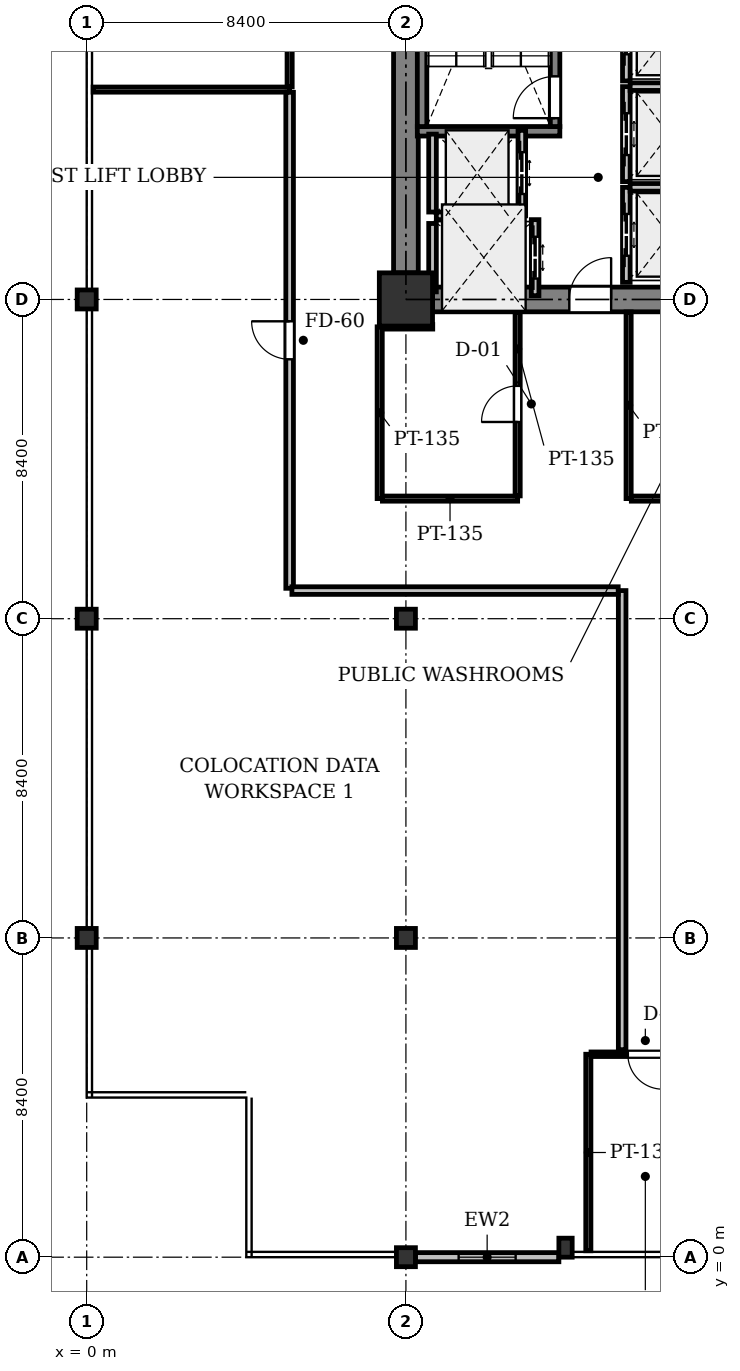
"""IFC4 building model, lengths in metres.
Left out: names, types, materials, properties, quantities, classifications, styles, units other than length and angle.
Written with IfcOpenShell. Run it as: python <this file> out.ifc"""

import sys

from ifc_helpers import new_model, si_unit, direction, frame, frame_2d, origin, origin_2d, place, context, subcontext, project, spatial, rectangle, i_section, extrude, element, fill, save


model = new_model("IFC4")
c1 = context("Model", 3, precision=1e-05, world=origin(), true_north=direction((0.0, 1.0)))
c2 = subcontext(c1, "Body", "Model", "MODEL_VIEW")
j1 = project(units=[si_unit("LENGTHUNIT", "METRE"), si_unit("PLANEANGLEUNIT", "RADIAN")], contexts=[c1])
p1 = place(None, origin())
s1 = spatial("IfcSite", under=j1, at=p1, CompositionType="ELEMENT")
p2 = place(p1, origin())
s2 = spatial("IfcBuilding", under=s1, at=p2, CompositionType="ELEMENT")
p3 = place(p2, frame((0.0, 0.0, 50.0)))
s3 = spatial("IfcBuildingStorey", under=s2, at=p3, CompositionType="ELEMENT", Elevation=50.0)
for number, where, z_axis, x_axis in (
    (1, (0.0, 8.4, 0.0), (0.0, 0.0, 1.0), (1.0, 0.0, 0.0)),
    (2, (0.0, 16.8, 0.0), (0.0, 0.0, 1.0), (1.0, 0.0, 0.0)),
    (3, (0.0, 25.2, 0.0), (0.0, 0.0, 1.0), (1.0, 0.0, 0.0)),
    (4, (8.4, 0.0, 0.0), (0.0, 0.0, 1.0), (1.0, 0.0, 0.0)),
    (5, (8.4, 8.4, 0.0), (0.0, 0.0, 1.0), (1.0, 0.0, 0.0)),
    (6, (8.4, 16.8, 0.0), (0.0, 0.0, 1.0), (1.0, 0.0, 0.0)),
):
    element("IfcColumn", number, at=place(p3, frame(where, z_axis=z_axis, x_axis=x_axis)), inside=s3, PredefinedType="COLUMN", context=c2, shape_type="SweptSolid", body=[
        extrude(i_section(OverallWidth=0.5, OverallDepth=0.5, WebThickness=0.028, FlangeThickness=0.04, at=origin_2d()), origin(), (0.0, 0.0, 1.0), 4.2),
    ])
p4 = place(p3, frame((8.4, 25.2, 0.0), z_axis=(0.0, 0.0, 1.0), x_axis=(1.0, 0.0, 0.0)))
e7 = element("IfcColumn", 7, at=p4, inside=s3, PredefinedType="COLUMN", context=c2, shape_type="SweptSolid", body=[
    extrude(rectangle(XDim=1.4, YDim=1.4, at=origin_2d()), origin(), (0.0, 0.0, 1.0), 4.2),
])
p5 = place(p3, frame((12.6, 0.25, 0.0), z_axis=(0.0, 0.0, 1.0), x_axis=(1.0, 0.0, 0.0)))
e8 = element("IfcColumn", 8, at=p5, inside=s3, PredefinedType="PILASTER", context=c2, shape_type="SweptSolid", body=[
    extrude(rectangle(XDim=0.35, YDim=0.5, at=origin_2d()), origin(), (0.0, 0.0, 1.0), 4.2),
])
p6 = place(p3, frame((12.425, 0.0, 0.0), z_axis=(0.0, 0.0, 1.0), x_axis=(-1.0, 0.0, 0.0)))
e9 = element("IfcWall", 9, at=p6, inside=s3, PredefinedType="STANDARD", context=c2, shape_type="SweptSolid", body=[
    extrude(rectangle(XDim=3.775, YDim=0.24, at=frame_2d((1.888, 0.0))), origin(), (0.0, 0.0, 1.0), 3.471),
])
p7 = place(p6, frame((1.137, 0.0, 0.9)))
e10 = element("IfcOpeningElement", 10, at=p7, cuts=e9, PredefinedType="OPENING", context=c2, shape_type="SweptSolid", body=[
    extrude(rectangle(XDim=1.5, YDim=1.6, at=frame_2d((0.75, 0.8))), frame((0.0, 0.13, 0.0), z_axis=(0.0, -1.0, 0.0), x_axis=(1.0, 0.0, 0.0)), (0.0, 0.0, 1.0), 0.26),
])
p8 = place(p3, frame((8.4, 25.9, 0.0), z_axis=(0.0, 0.0, 1.0), x_axis=(0.0, 1.0, 0.0)))
e11 = element("IfcWall", 11, at=p8, inside=s3, PredefinedType="SHEAR", context=c2, shape_type="SweptSolid", body=[
    extrude(rectangle(XDim=7.0, YDim=0.65, at=frame_2d((3.5, 0.0))), origin(), (0.0, 0.0, 1.0), 3.925),
])
p9 = place(p3, frame((9.1, 25.2, 0.0), z_axis=(0.0, 0.0, 1.0), x_axis=(1.0, 0.0, 0.0)))
e12 = element("IfcWall", 12, at=p9, inside=s3, PredefinedType="SHEAR", context=c2, shape_type="SweptSolid", body=[
    extrude(rectangle(XDim=7.0, YDim=0.65, at=frame_2d((3.5, 0.0))), origin(), (0.0, 0.0, 1.0), 3.925),
])
p10 = place(p9, frame((3.6, 0.0, 0.0)))
e13 = element("IfcOpeningElement", 13, at=p10, cuts=e12, PredefinedType="OPENING", context=c2, shape_type="SweptSolid", body=[
    extrude(rectangle(XDim=1.1, YDim=2.15, at=frame_2d((0.55, 1.075))), frame((0.0, 0.335, 0.0), z_axis=(0.0, -1.0, 0.0), x_axis=(1.0, 0.0, 0.0)), (0.0, 0.0, 1.0), 0.67),
])
p11 = place(p3, frame((12.45, 29.625, 0.0), z_axis=(0.0, 0.0, 1.0), x_axis=(-1.0, 0.0, 0.0)))
e14 = element("IfcWall", 14, at=p11, inside=s3, PredefinedType="SHEAR", context=c2, shape_type="SweptSolid", body=[
    extrude(rectangle(XDim=3.75, YDim=0.25, at=frame_2d((1.875, 0.0))), origin(), (0.0, 0.0, 1.0), 3.925),
])
p12 = place(p3, frame((12.325, 29.75, 0.0), z_axis=(0.0, 0.0, 1.0), x_axis=(0.0, 1.0, 0.0)))
e15 = element("IfcWall", 15, at=p12, inside=s3, PredefinedType="SHEAR", context=c2, shape_type="SweptSolid", body=[
    extrude(rectangle(XDim=7.75, YDim=0.25, at=frame_2d((3.875, 0.0))), origin(), (0.0, 0.0, 1.0), 3.925),
])
p13 = place(p12, frame((0.22, 0.0, 0.0)))
e16 = element("IfcOpeningElement", 16, at=p13, cuts=e15, PredefinedType="OPENING", context=c2, shape_type="SweptSolid", body=[
    extrude(rectangle(XDim=1.1, YDim=2.15, at=frame_2d((0.55, 1.075))), frame((0.0, 0.135, 0.0), z_axis=(0.0, -1.0, 0.0), x_axis=(1.0, 0.0, 0.0)), (0.0, 0.0, 1.0), 0.27),
])
p14 = place(p3, frame((8.825, 29.75, 0.0), z_axis=(0.0, 0.0, 1.0), x_axis=(0.0, 1.0, 0.0)))
e17 = element("IfcWall", 17, at=p14, inside=s3, PredefinedType="SHEAR", context=c2, shape_type="SweptSolid", body=[
    extrude(rectangle(XDim=7.75, YDim=0.25, at=frame_2d((3.875, 0.0))), origin(), (0.0, 0.0, 1.0), 3.925),
])
p15 = place(p3, frame((11.45, 27.4, 0.0), z_axis=(0.0, 0.0, 1.0), x_axis=(0.0, 1.0, 0.0)))
e18 = element("IfcWall", 18, at=p15, inside=s3, PredefinedType="PARTITIONING", context=c2, shape_type="SweptSolid", body=[
    extrude(rectangle(XDim=2.25, YDim=0.2, at=frame_2d((1.125, 0.0))), origin(), (0.0, 0.0, 1.0), 3.925),
])
p16 = place(p15, frame((0.575, 0.0, 0.0)))
e19 = element("IfcOpeningElement", 19, at=p16, cuts=e18, PredefinedType="OPENING", context=c2, shape_type="SweptSolid", body=[
    extrude(rectangle(XDim=1.1, YDim=2.2, at=frame_2d((0.55, 1.1))), frame((0.0, 0.11, 0.0), z_axis=(0.0, -1.0, 0.0), x_axis=(1.0, 0.0, 0.0)), (0.0, 0.0, 1.0), 0.22),
])
p17 = place(p3, frame((9.1, 27.5, 0.0), z_axis=(0.0, 0.0, 1.0), x_axis=(0.0, 1.0, 0.0)))
e20 = element("IfcWall", 20, at=p17, inside=s3, PredefinedType="PARTITIONING", context=c2, shape_type="SweptSolid", body=[
    extrude(rectangle(XDim=2.05, YDim=0.2, at=frame_2d((1.025, 0.0))), origin(), (0.0, 0.0, 1.0), 3.925),
])
p18 = place(p3, frame((9.2, 27.4, 0.0), z_axis=(0.0, 0.0, 1.0), x_axis=(1.0, 0.0, 0.0)))
e21 = element("IfcWall", 21, at=p18, inside=s3, PredefinedType="PARTITIONING", context=c2, shape_type="SweptSolid", body=[
    extrude(rectangle(XDim=2.15, YDim=0.2, at=frame_2d((1.075, 0.0))), origin(), (0.0, 0.0, 1.0), 3.925),
])
p19 = place(p3, frame((11.8, 25.3, 0.0), z_axis=(0.0, 0.0, 1.0), x_axis=(0.0, 1.0, 0.0)))
e22 = element("IfcWall", 22, at=p19, inside=s3, PredefinedType="PARTITIONING", context=c2, shape_type="SweptSolid", body=[
    extrude(rectangle(XDim=2.0, YDim=0.2, at=frame_2d((1.0, 0.0))), origin(), (0.0, 0.0, 1.0), 3.925),
])
p20 = place(p19, frame((0.45, 0.0, 0.0)))
e23 = element("IfcOpeningElement", 23, at=p20, cuts=e22, PredefinedType="OPENING", context=c2, shape_type="SweptSolid", body=[
    extrude(rectangle(XDim=1.1, YDim=2.2, at=frame_2d((0.55, 1.1))), frame((0.0, 0.11, 0.0), z_axis=(0.0, -1.0, 0.0), x_axis=(1.0, 0.0, 0.0)), (0.0, 0.0, 1.0), 0.22),
])
p21 = place(p3, frame((9.1, 25.4, 0.0), z_axis=(0.0, 0.0, 1.0), x_axis=(0.0, 1.0, 0.0)))
e24 = element("IfcWall", 24, at=p21, inside=s3, PredefinedType="PARTITIONING", context=c2, shape_type="SweptSolid", body=[
    extrude(rectangle(XDim=1.8, YDim=0.2, at=frame_2d((0.9, 0.0))), origin(), (0.0, 0.0, 1.0), 3.925),
])
p22 = place(p3, frame((14.2, 25.65, 0.0), z_axis=(0.0, 0.0, 1.0), x_axis=(0.0, 1.0, 0.0)))
e25 = element("IfcWall", 25, at=p22, inside=s3, PredefinedType="PARTITIONING", context=c2, shape_type="SweptSolid", body=[
    extrude(rectangle(XDim=2.5, YDim=0.2, at=frame_2d((1.25, 0.0))), origin(), (0.0, 0.0, 1.0), 3.925),
])
p23 = place(p22, frame((0.7, 0.0, 0.0)))
e26 = element("IfcOpeningElement", 26, at=p23, cuts=e25, PredefinedType="OPENING", context=c2, shape_type="SweptSolid", body=[
    extrude(rectangle(XDim=1.1, YDim=2.2, at=frame_2d((0.55, 1.1))), frame((0.0, 0.11, 0.0), z_axis=(0.0, -1.0, 0.0), x_axis=(1.0, 0.0, 0.0)), (0.0, 0.0, 1.0), 0.22),
])
p24 = place(p3, frame((14.3, 28.15, 0.0), z_axis=(0.0, 0.0, 1.0), x_axis=(1.0, 0.0, 0.0)))
e27 = element("IfcWall", 27, at=p24, inside=s3, PredefinedType="PARTITIONING", context=c2, shape_type="SweptSolid", body=[
    extrude(rectangle(XDim=2.05, YDim=0.2, at=frame_2d((1.025, 0.0))), origin(), (0.0, 0.0, 1.0), 3.925),
])
p25 = place(p3, frame((14.2, 28.3, 0.0), z_axis=(0.0, 0.0, 1.0), x_axis=(0.0, 1.0, 0.0)))
e28 = element("IfcWall", 28, at=p25, inside=s3, PredefinedType="PARTITIONING", context=c2, shape_type="SweptSolid", body=[
    extrude(rectangle(XDim=2.5, YDim=0.2, at=frame_2d((1.25, 0.0))), origin(), (0.0, 0.0, 1.0), 3.925),
])
p26 = place(p25, frame((0.7, 0.0, 0.0)))
e29 = element("IfcOpeningElement", 29, at=p26, cuts=e28, PredefinedType="OPENING", context=c2, shape_type="SweptSolid", body=[
    extrude(rectangle(XDim=1.1, YDim=2.2, at=frame_2d((0.55, 1.1))), frame((0.0, 0.11, 0.0), z_axis=(0.0, -1.0, 0.0), x_axis=(1.0, 0.0, 0.0)), (0.0, 0.0, 1.0), 0.22),
])
p27 = place(p3, frame((14.3, 30.8, 0.0), z_axis=(0.0, 0.0, 1.0), x_axis=(1.0, 0.0, 0.0)))
e30 = element("IfcWall", 30, at=p27, inside=s3, PredefinedType="PARTITIONING", context=c2, shape_type="SweptSolid", body=[
    extrude(rectangle(XDim=2.05, YDim=0.2, at=frame_2d((1.025, 0.0))), origin(), (0.0, 0.0, 1.0), 3.925),
])
p28 = place(p3, frame((14.2, 30.95, 0.0), z_axis=(0.0, 0.0, 1.0), x_axis=(0.0, 1.0, 0.0)))
e31 = element("IfcWall", 31, at=p28, inside=s3, PredefinedType="PARTITIONING", context=c2, shape_type="SweptSolid", body=[
    extrude(rectangle(XDim=2.5, YDim=0.2, at=frame_2d((1.25, 0.0))), origin(), (0.0, 0.0, 1.0), 3.925),
])
p29 = place(p28, frame((0.7, 0.0, 0.0)))
e32 = element("IfcOpeningElement", 32, at=p29, cuts=e31, PredefinedType="OPENING", context=c2, shape_type="SweptSolid", body=[
    extrude(rectangle(XDim=1.1, YDim=2.2, at=frame_2d((0.55, 1.1))), frame((0.0, 0.11, 0.0), z_axis=(0.0, -1.0, 0.0), x_axis=(1.0, 0.0, 0.0)), (0.0, 0.0, 1.0), 0.22),
])
p30 = place(p3, frame((13.2, 5.34, 0.0), z_axis=(0.0, 0.0, 1.0), x_axis=(0.0, -1.0, 0.0)))
e33 = element("IfcWall", 33, at=p30, inside=s3, PredefinedType="PARTITIONING", context=c2, shape_type="SweptSolid", body=[
    extrude(rectangle(XDim=5.171, YDim=0.135, at=frame_2d((2.585, 0.0))), origin(), (0.0, 0.0, 1.0), 3.925),
])
p31 = place(p3, frame((16.128, 5.34, 0.0), z_axis=(0.0, 0.0, 1.0), x_axis=(-1.0, 0.0, 0.0)))
e34 = element("IfcWall", 34, at=p31, inside=s3, PredefinedType="PARTITIONING", context=c2, shape_type="SweptSolid", body=[
    extrude(rectangle(XDim=2.857, YDim=0.12, at=frame_2d((1.428, 0.0))), origin(), (0.0, 0.0, 1.0), 3.925),
])
p32 = place(p31, frame((0.969, 0.0, 0.0)))
e35 = element("IfcOpeningElement", 35, at=p32, cuts=e34, PredefinedType="OPENING", context=c2, shape_type="SweptSolid", body=[
    extrude(rectangle(XDim=0.92, YDim=2.1, at=frame_2d((0.46, 1.05))), frame((0.0, 0.07, 0.0), z_axis=(0.0, -1.0, 0.0), x_axis=(1.0, 0.0, 0.0)), (0.0, 0.0, 1.0), 0.14),
])
p33 = place(p3, frame((14.26, 24.871, 0.0), z_axis=(0.0, 0.0, 1.0), x_axis=(0.0, -1.0, 0.0)))
e36 = element("IfcWall", 36, at=p33, inside=s3, PredefinedType="PARTITIONING", context=c2, shape_type="SweptSolid", body=[
    extrude(rectangle(XDim=4.911, YDim=0.135, at=frame_2d((2.456, 0.0))), origin(), (0.0, 0.0, 1.0), 3.925),
])
p34 = place(p3, frame((14.332, 19.96, 0.0), z_axis=(0.0, 0.0, 1.0), x_axis=(1.0, 0.0, 0.0)))
e37 = element("IfcWall", 37, at=p34, inside=s3, PredefinedType="PARTITIONING", context=c2, shape_type="SweptSolid", body=[
    extrude(rectangle(XDim=3.208, YDim=0.135, at=frame_2d((1.604, 0.0))), origin(), (0.0, 0.0, 1.0), 3.323),
])
p35 = place(p3, frame((9.106, 24.481, 0.0), z_axis=(0.0, 0.0, 1.0), x_axis=(-0.999999755233, -0.000699667487, 0.0)))
e38 = element("IfcWall", 38, at=p35, inside=s3, PredefinedType="PARTITIONING", context=c2, shape_type="SweptSolid", body=[
    extrude(rectangle(XDim=1.396, YDim=0.12, at=frame_2d((0.698, 0.0))), origin(), (0.0, 0.0, 1.0), 3.323),
])
p36 = place(p3, frame((7.71, 24.48, 0.0), z_axis=(0.0, 0.0, 1.0), x_axis=(0.0, -1.0, 0.0)))
e39 = element("IfcWall", 39, at=p36, inside=s3, PredefinedType="PARTITIONING", context=c2, shape_type="SweptSolid", body=[
    extrude(rectangle(XDim=4.52, YDim=0.135, at=frame_2d((2.26, 0.0))), origin(), (0.0, 0.0, 1.0), 3.925),
])
p37 = place(p3, frame((7.781, 19.96, 0.0), z_axis=(0.0, 0.0, 1.0), x_axis=(1.0, 0.0, 0.0)))
e40 = element("IfcWall", 40, at=p37, inside=s3, PredefinedType="PARTITIONING", context=c2, shape_type="SweptSolid", body=[
    extrude(rectangle(XDim=3.559, YDim=0.135, at=frame_2d((1.779, 0.0))), origin(), (0.0, 0.0, 1.0), 3.323),
])
p38 = place(p3, frame((11.34, 20.031, 0.0), z_axis=(0.0, 0.0, 1.0), x_axis=(0.0, 1.0, 0.0)))
e41 = element("IfcWall", 41, at=p38, inside=s3, PredefinedType="PARTITIONING", context=c2, shape_type="SweptSolid", body=[
    extrude(rectangle(XDim=4.84, YDim=0.135, at=frame_2d((2.42, 0.0))), origin(), (0.0, 0.0, 1.0), 3.925),
])
p39 = place(p38, frame((1.945, 0.0, 0.0)))
e42 = element("IfcOpeningElement", 42, at=p39, cuts=e41, PredefinedType="OPENING", context=c2, shape_type="SweptSolid", body=[
    extrude(rectangle(XDim=0.95, YDim=2.15, at=frame_2d((0.475, 1.075))), frame((0.0, 0.077, 0.0), z_axis=(0.0, -1.0, 0.0), x_axis=(1.0, 0.0, 0.0)), (0.0, 0.0, 1.0), 0.155),
])
p40 = place(p3, frame((0.169, 30.722, 0.0), z_axis=(0.0, 0.0, 1.0), x_axis=(1.0, 0.0, 0.0)))
e43 = element("IfcWall", 43, at=p40, inside=s3, PredefinedType="PARTITIONING", context=c2, shape_type="SweptSolid", body=[
    extrude(rectangle(XDim=5.171, YDim=0.135, at=frame_2d((2.585, 0.0))), origin(), (0.0, 0.0, 1.0), 3.566),
])
p41 = place(p3, frame((5.34, 30.793, 0.0), z_axis=(0.0, 0.0, 1.0), x_axis=(0.0, 1.0, 0.0)))
e44 = element("IfcWall", 44, at=p41, inside=s3, PredefinedType="PARTITIONING", context=c2, shape_type="SweptSolid", body=[
    extrude(rectangle(XDim=5.406, YDim=0.135, at=frame_2d((2.703, 0.0))), origin(), (0.0, 0.0, 1.0), 3.313),
])
p42 = place(p41, frame((2.228, 0.0, 0.0)))
e45 = element("IfcOpeningElement", 45, at=p42, cuts=e44, PredefinedType="OPENING", context=c2, shape_type="SweptSolid", body=[
    extrude(rectangle(XDim=0.95, YDim=2.15, at=frame_2d((0.475, 1.075))), frame((0.0, 0.077, 0.0), z_axis=(0.0, -1.0, 0.0), x_axis=(1.0, 0.0, 0.0)), (0.0, 0.0, 1.0), 0.155),
])
p43 = place(p3, frame((5.34, 17.6, 0.0), z_axis=(0.0, 0.0, 1.0), x_axis=(0.0, 1.0, 0.0)))
e46 = element("IfcWall", 46, at=p43, inside=s3, PredefinedType="PARTITIONING", context=c2, shape_type="SweptSolid", body=[
    extrude(rectangle(XDim=13.05, YDim=0.2, at=frame_2d((6.525, 0.0))), origin(), (0.0, 0.0, 1.0), 3.313),
])
p44 = place(p43, frame((6.025, 0.0, 0.0)))
e47 = element("IfcOpeningElement", 47, at=p44, cuts=e46, PredefinedType="OPENING", context=c2, shape_type="SweptSolid", body=[
    extrude(rectangle(XDim=1.0, YDim=2.15, at=frame_2d((0.5, 1.075))), frame((0.0, 0.11, 0.0), z_axis=(0.0, -1.0, 0.0), x_axis=(1.0, 0.0, 0.0)), (0.0, 0.0, 1.0), 0.22),
])
p45 = place(p3, frame((14.09, 5.46, 0.0), z_axis=(0.0, 0.0, 1.0), x_axis=(0.0, 1.0, 0.0)))
e48 = element("IfcWall", 48, at=p45, inside=s3, PredefinedType="PARTITIONING", context=c2, shape_type="SweptSolid", body=[
    extrude(rectangle(XDim=12.08, YDim=0.2, at=frame_2d((6.04, 0.0))), origin(), (0.0, 0.0, 1.0), 3.313),
])
p46 = place(p3, frame((13.986, 17.54, 0.0), z_axis=(0.0, 0.0, 1.0), x_axis=(-1.0, 0.0, 0.0)))
e49 = element("IfcWall", 49, at=p46, inside=s3, PredefinedType="PARTITIONING", context=c2, shape_type="SweptSolid", body=[
    extrude(rectangle(XDim=8.586, YDim=0.2, at=frame_2d((4.293, 0.0))), origin(), (0.0, 0.0, 1.0), 3.323),
])
p47 = place(p7, origin())
e50 = element("IfcWindow", 50, at=p47, inside=s3, PartitioningType="SINGLE_PANEL", PredefinedType="WINDOW", context=c2, shape_type="SweptSolid", body=[
    extrude(rectangle(XDim=1.5, YDim=1.6, at=frame_2d((0.75, 0.8))), frame((0.0, 0.03, 0.0), z_axis=(0.0, -1.0, 0.0), x_axis=(1.0, 0.0, 0.0)), (0.0, 0.0, 1.0), 0.06),
])
fill(e10, e50)
p48 = place(p10, origin())
e51 = element("IfcDoor", 51, at=p48, inside=s3, OperationType="SINGLE_SWING_RIGHT", PredefinedType="DOOR", context=c2, shape_type="SweptSolid", body=[
    extrude(rectangle(XDim=1.1, YDim=2.15, at=frame_2d((0.55, 1.075))), frame((0.0, 0.025, 0.0), z_axis=(0.0, -1.0, 0.0), x_axis=(1.0, 0.0, 0.0)), (0.0, 0.0, 1.0), 0.05),
])
fill(e13, e51)
p49 = place(p13, origin())
e52 = element("IfcDoor", 52, at=p49, inside=s3, OperationType="SINGLE_SWING_LEFT", PredefinedType="DOOR", context=c2, shape_type="SweptSolid", body=[
    extrude(rectangle(XDim=1.1, YDim=2.15, at=frame_2d((0.55, 1.075))), frame((0.0, 0.025, 0.0), z_axis=(0.0, -1.0, 0.0), x_axis=(1.0, 0.0, 0.0)), (0.0, 0.0, 1.0), 0.05),
])
fill(e16, e52)
p50 = place(p16, origin())
e53 = element("IfcDoor", 53, at=p50, inside=s3, OperationType="DOUBLE_DOOR_SLIDING", PredefinedType="DOOR", context=c2, shape_type="SweptSolid", body=[
    extrude(rectangle(XDim=1.1, YDim=2.2, at=frame_2d((0.55, 1.1))), frame((0.0, 0.025, 0.0), z_axis=(0.0, -1.0, 0.0), x_axis=(1.0, 0.0, 0.0)), (0.0, 0.0, 1.0), 0.05),
])
fill(e19, e53)
p51 = place(p20, origin())
e54 = element("IfcDoor", 54, at=p51, inside=s3, OperationType="DOUBLE_DOOR_SLIDING", PredefinedType="DOOR", context=c2, shape_type="SweptSolid", body=[
    extrude(rectangle(XDim=1.1, YDim=2.2, at=frame_2d((0.55, 1.1))), frame((0.0, 0.025, 0.0), z_axis=(0.0, -1.0, 0.0), x_axis=(1.0, 0.0, 0.0)), (0.0, 0.0, 1.0), 0.05),
])
fill(e23, e54)
p52 = place(p23, origin())
e55 = element("IfcDoor", 55, at=p52, inside=s3, OperationType="DOUBLE_DOOR_SLIDING", PredefinedType="DOOR", context=c2, shape_type="SweptSolid", body=[
    extrude(rectangle(XDim=1.1, YDim=2.2, at=frame_2d((0.55, 1.1))), frame((0.0, 0.025, 0.0), z_axis=(0.0, -1.0, 0.0), x_axis=(1.0, 0.0, 0.0)), (0.0, 0.0, 1.0), 0.05),
])
fill(e26, e55)
p53 = place(p26, origin())
e56 = element("IfcDoor", 56, at=p53, inside=s3, OperationType="DOUBLE_DOOR_SLIDING", PredefinedType="DOOR", context=c2, shape_type="SweptSolid", body=[
    extrude(rectangle(XDim=1.1, YDim=2.2, at=frame_2d((0.55, 1.1))), frame((0.0, 0.025, 0.0), z_axis=(0.0, -1.0, 0.0), x_axis=(1.0, 0.0, 0.0)), (0.0, 0.0, 1.0), 0.05),
])
fill(e29, e56)
p54 = place(p29, origin())
e57 = element("IfcDoor", 57, at=p54, inside=s3, OperationType="DOUBLE_DOOR_SLIDING", PredefinedType="DOOR", context=c2, shape_type="SweptSolid", body=[
    extrude(rectangle(XDim=1.1, YDim=2.2, at=frame_2d((0.55, 1.1))), frame((0.0, 0.025, 0.0), z_axis=(0.0, -1.0, 0.0), x_axis=(1.0, 0.0, 0.0)), (0.0, 0.0, 1.0), 0.05),
])
fill(e32, e57)
p55 = place(p32, origin())
e58 = element("IfcDoor", 58, at=p55, inside=s3, OperationType="SINGLE_SWING_LEFT", PredefinedType="DOOR", context=c2, shape_type="SweptSolid", body=[
    extrude(rectangle(XDim=0.92, YDim=2.1, at=frame_2d((0.46, 1.05))), frame((0.0, 0.025, 0.0), z_axis=(0.0, -1.0, 0.0), x_axis=(1.0, 0.0, 0.0)), (0.0, 0.0, 1.0), 0.05),
])
fill(e35, e58)
p56 = place(p39, origin())
e59 = element("IfcDoor", 59, at=p56, inside=s3, OperationType="SINGLE_SWING_LEFT", PredefinedType="DOOR", context=c2, shape_type="SweptSolid", body=[
    extrude(rectangle(XDim=0.95, YDim=2.15, at=frame_2d((0.475, 1.075))), frame((0.0, 0.025, 0.0), z_axis=(0.0, -1.0, 0.0), x_axis=(1.0, 0.0, 0.0)), (0.0, 0.0, 1.0), 0.05),
])
fill(e42, e59)
p57 = place(p44, origin())
e60 = element("IfcDoor", 60, at=p57, inside=s3, OperationType="SINGLE_SWING_RIGHT", PredefinedType="DOOR", context=c2, shape_type="SweptSolid", body=[
    extrude(rectangle(XDim=1.0, YDim=2.15, at=frame_2d((0.5, 1.075))), frame((0.0, 0.025, 0.0), z_axis=(0.0, -1.0, 0.0), x_axis=(1.0, 0.0, 0.0)), (0.0, 0.0, 1.0), 0.05),
])
fill(e47, e60)
save(model, sys.argv[1])
